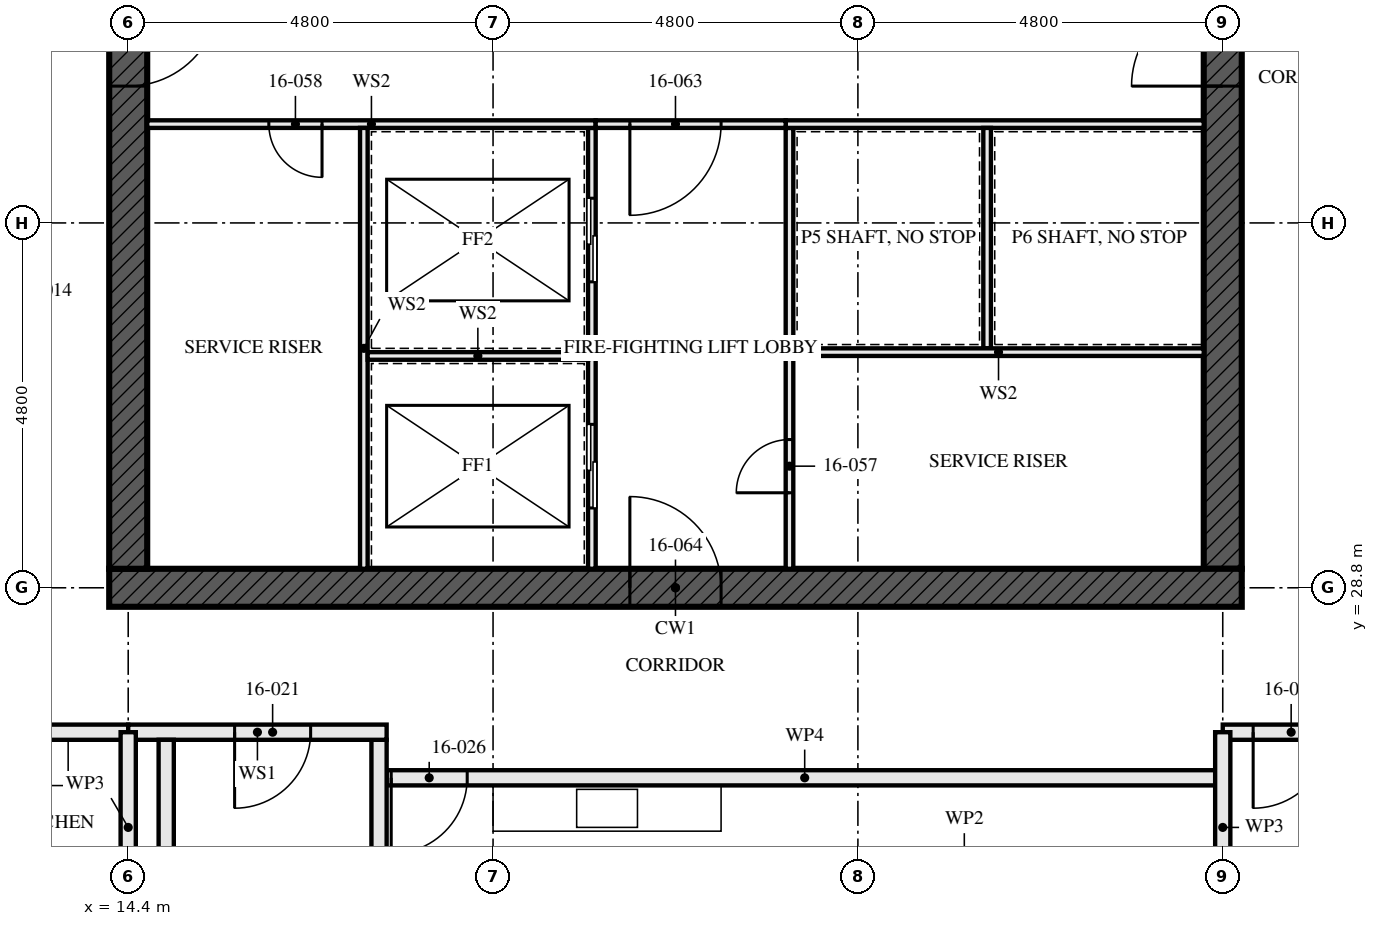
"""IFC4 building model, lengths in metres.
Left out: names, types, materials, properties, quantities, classifications, styles, units other than length and angle.
Written with IfcOpenShell. Run it as: python <this file> out.ifc"""

import sys

from ifc_helpers import new_model, si_unit, direction, frame, frame_2d, origin, place, context, subcontext, project, spatial, rectangle, extrude, element, fill, save


model = new_model("IFC4")
c1 = context("Model", 3, precision=1e-05, world=origin(), true_north=direction((0.0, 1.0)))
c2 = subcontext(c1, "Body", "Model", "MODEL_VIEW")
j1 = project(units=[si_unit("LENGTHUNIT", "METRE"), si_unit("PLANEANGLEUNIT", "RADIAN")], contexts=[c1])
p1 = place(None, origin())
s1 = spatial("IfcSite", under=j1, at=p1, CompositionType="ELEMENT")
p2 = place(p1, origin())
s2 = spatial("IfcBuilding", under=s1, at=p2, CompositionType="ELEMENT")
p3 = place(p2, frame((0.0, 0.0, 62.0)))
s3 = spatial("IfcBuildingStorey", under=s2, at=p3, CompositionType="ELEMENT", Elevation=62.0)
p4 = place(p3, frame((14.15, 28.8, -0.17), z_axis=(0.0, 0.0, 1.0), x_axis=(1.0, 0.0, 0.0)))
e1 = element("IfcWall", 1, at=p4, inside=s3, PredefinedType="SHEAR", context=c2, shape_type="SweptSolid", body=[
    extrude(rectangle(XDim=14.9, YDim=0.5, at=frame_2d((7.45, 0.0))), origin(), (0.0, 0.0, 1.0), 3.5),
])
p5 = place(p4, frame((6.85, 0.0, 0.17)))
e2 = element("IfcOpeningElement", 2, at=p5, cuts=e1, PredefinedType="OPENING", context=c2, shape_type="SweptSolid", body=[
    extrude(rectangle(XDim=1.2, YDim=2.1, at=frame_2d((0.6, 1.05))), frame((0.0, 0.26, 0.0), z_axis=(0.0, -1.0, 0.0), x_axis=(1.0, 0.0, 0.0)), (0.0, 0.0, 1.0), 0.521),
])
p6 = place(p3, frame((14.4, 42.95, -0.17), z_axis=(0.0, 0.0, 1.0), x_axis=(0.0, -1.0, 0.0)))
e3 = element("IfcWall", 3, at=p6, inside=s3, PredefinedType="SHEAR", context=c2, shape_type="SweptSolid", body=[
    extrude(rectangle(XDim=13.9, YDim=0.5, at=frame_2d((6.95, 0.0))), origin(), (0.0, 0.0, 1.0), 3.5),
])
p7 = place(p6, frame((6.35, 0.0, 0.17)))
e4 = element("IfcOpeningElement", 4, at=p7, cuts=e3, PredefinedType="OPENING", context=c2, shape_type="SweptSolid", body=[
    extrude(rectangle(XDim=1.2, YDim=2.1, at=frame_2d((0.6, 1.05))), frame((0.0, 0.26, 0.0), z_axis=(0.0, -1.0, 0.0), x_axis=(1.0, 0.0, 0.0)), (0.0, 0.0, 1.0), 0.521),
])
p8 = place(p3, frame((28.8, 29.05, -0.17), z_axis=(0.0, 0.0, 1.0), x_axis=(0.0, 1.0, 0.0)))
e5 = element("IfcWall", 5, at=p8, inside=s3, PredefinedType="SHEAR", context=c2, shape_type="SweptSolid", body=[
    extrude(rectangle(XDim=13.9, YDim=0.5, at=frame_2d((6.95, 0.0))), origin(), (0.0, 0.0, 1.0), 3.5),
])
p9 = place(p8, frame((6.35, 0.0, 0.17)))
e6 = element("IfcOpeningElement", 6, at=p9, cuts=e5, PredefinedType="OPENING", context=c2, shape_type="SweptSolid", body=[
    extrude(rectangle(XDim=1.2, YDim=2.1, at=frame_2d((0.6, 1.05))), frame((0.0, 0.26, 0.0), z_axis=(0.0, -1.0, 0.0), x_axis=(1.0, 0.0, 0.0)), (0.0, 0.0, 1.0), 0.521),
])
p10 = place(p3, frame((4.8, 26.9, 0.0), z_axis=(0.0, 0.0, 1.0), x_axis=(1.0, 0.0, 0.0)))
e7 = element("IfcWall", 7, at=p10, inside=s3, PredefinedType="PARTITIONING", context=c2, shape_type="SweptSolid", body=[
    extrude(rectangle(XDim=9.6, YDim=0.2, at=frame_2d((4.8, 0.0))), origin(), (0.0, 0.0, 1.0), 3.33),
])
p11 = place(p10, frame((0.4, 0.0, 0.0)))
e8 = element("IfcOpeningElement", 8, at=p11, cuts=e7, PredefinedType="OPENING", context=c2, shape_type="SweptSolid", body=[
    extrude(rectangle(XDim=1.0, YDim=2.1, at=frame_2d((0.5, 1.05))), frame((0.0, 0.111, 0.0), z_axis=(0.0, -1.0, 0.0), x_axis=(1.0, 0.0, 0.0)), (0.0, 0.0, 1.0), 0.221),
])
for number, where, z_axis, x_axis in (
    (9, (14.9, 22.1, 0.0), (0.0, 0.0, 1.0), (0.0, 1.0, 0.0)),
    (10, (17.7, 22.1, 0.0), (0.0, 0.0, 1.0), (0.0, 1.0, 0.0)),
):
    element("IfcWall", number, at=place(p3, frame(where, z_axis=z_axis, x_axis=x_axis)), inside=s3, PredefinedType="SOLIDWALL", context=c2, shape_type="SweptSolid", body=[
        extrude(rectangle(XDim=4.7, YDim=0.2, at=frame_2d((2.35, 0.0))), origin(), (0.0, 0.0, 1.0), 2.99),
    ])
p12 = place(p3, frame((14.4, 26.9, 0.0), z_axis=(0.0, 0.0, 1.0), x_axis=(1.0, 0.0, 0.0)))
e11 = element("IfcWall", 11, at=p12, inside=s3, PredefinedType="SOLIDWALL", context=c2, shape_type="SweptSolid", body=[
    extrude(rectangle(XDim=3.4, YDim=0.2, at=frame_2d((1.7, 0.0))), origin(), (0.0, 0.0, 1.0), 3.33),
])
p13 = place(p12, frame((1.4, 0.0, 0.0)))
e12 = element("IfcOpeningElement", 12, at=p13, cuts=e11, PredefinedType="OPENING", context=c2, shape_type="SweptSolid", body=[
    extrude(rectangle(XDim=1.0, YDim=2.1, at=frame_2d((0.5, 1.05))), frame((0.0, 0.111, 0.0), z_axis=(0.0, -1.0, 0.0), x_axis=(1.0, 0.0, 0.0)), (0.0, 0.0, 1.0), 0.221),
])
p14 = place(p3, frame((17.8, 26.3, 0.0), z_axis=(0.0, 0.0, 1.0), x_axis=(1.0, 0.0, 0.0)))
e13 = element("IfcWall", 13, at=p14, inside=s3, PredefinedType="PARTITIONING", context=c2, shape_type="SweptSolid", body=[
    extrude(rectangle(XDim=11.0, YDim=0.2, at=frame_2d((5.5, 0.0))), origin(), (0.0, 0.0, 1.0), 2.55),
])
p15 = place(p14, frame((0.06, 0.0, 0.0)))
e14 = element("IfcOpeningElement", 14, at=p15, cuts=e13, PredefinedType="OPENING", context=c2, shape_type="SweptSolid", body=[
    extrude(rectangle(XDim=1.0, YDim=2.1, at=frame_2d((0.5, 1.05))), frame((0.0, 0.111, 0.0), z_axis=(0.0, -1.0, 0.0), x_axis=(1.0, 0.0, 0.0)), (0.0, 0.0, 1.0), 0.221),
])
p16 = place(p3, frame((28.8, 26.9, 0.0), z_axis=(0.0, 0.0, 1.0), x_axis=(1.0, 0.0, 0.0)))
e15 = element("IfcWall", 15, at=p16, inside=s3, PredefinedType="PARTITIONING", context=c2, shape_type="SweptSolid", body=[
    extrude(rectangle(XDim=9.6, YDim=0.2, at=frame_2d((4.8, 0.0))), origin(), (0.0, 0.0, 1.0), 3.33),
])
p17 = place(p16, frame((0.4, 0.0, 0.0)))
e16 = element("IfcOpeningElement", 16, at=p17, cuts=e15, PredefinedType="OPENING", context=c2, shape_type="SweptSolid", body=[
    extrude(rectangle(XDim=1.0, YDim=2.1, at=frame_2d((0.5, 1.05))), frame((0.0, 0.111, 0.0), z_axis=(0.0, -1.0, 0.0), x_axis=(1.0, 0.0, 0.0)), (0.0, 0.0, 1.0), 0.221),
])
p18 = place(p3, frame((20.5, 29.05, 0.0), z_axis=(0.0, 0.0, 1.0), x_axis=(0.0, 1.0, 0.0)))
e17 = element("IfcWall", 17, at=p18, inside=s3, PredefinedType="SOLIDWALL", context=c2, shape_type="SweptSolid", body=[
    extrude(rectangle(XDim=5.8, YDim=0.1, at=frame_2d((2.9, 0.0))), origin(), (0.0, 0.0, 1.0), 3.33),
])
p19 = place(p18, frame((0.8, 0.0, 0.0)))
e18 = element("IfcOpeningElement", 18, at=p19, cuts=e17, PredefinedType="OPENING", context=c2, shape_type="SweptSolid", body=[
    extrude(rectangle(XDim=1.1, YDim=2.3, at=frame_2d((0.55, 1.15))), frame((0.0, 0.061, 0.0), z_axis=(0.0, -1.0, 0.0), x_axis=(1.0, 0.0, 0.0)), (0.0, 0.0, 1.0), 0.121),
])
p20 = place(p18, frame((3.775, 0.0, 0.0)))
e19 = element("IfcOpeningElement", 19, at=p20, cuts=e17, PredefinedType="OPENING", context=c2, shape_type="SweptSolid", body=[
    extrude(rectangle(XDim=1.1, YDim=2.3, at=frame_2d((0.55, 1.15))), frame((0.0, 0.061, 0.0), z_axis=(0.0, -1.0, 0.0), x_axis=(1.0, 0.0, 0.0)), (0.0, 0.0, 1.0), 0.121),
])
p21 = place(p3, frame((23.1, 29.05, 0.0), z_axis=(0.0, 0.0, 1.0), x_axis=(0.0, 1.0, 0.0)))
e20 = element("IfcWall", 20, at=p21, inside=s3, PredefinedType="SOLIDWALL", context=c2, shape_type="SweptSolid", body=[
    extrude(rectangle(XDim=5.8, YDim=0.1, at=frame_2d((2.9, 0.0))), origin(), (0.0, 0.0, 1.0), 3.33),
])
p22 = place(p21, frame((1.0, 0.0, 0.0)))
e21 = element("IfcOpeningElement", 21, at=p22, cuts=e20, PredefinedType="OPENING", context=c2, shape_type="SweptSolid", body=[
    extrude(rectangle(XDim=0.7, YDim=2.1, at=frame_2d((0.35, 1.05))), frame((0.0, 0.061, 0.0), z_axis=(0.0, -1.0, 0.0), x_axis=(1.0, 0.0, 0.0)), (0.0, 0.0, 1.0), 0.121),
])
p23 = place(p3, frame((14.65, 34.9, 0.0), z_axis=(0.0, 0.0, 1.0), x_axis=(1.0, 0.0, 0.0)))
e22 = element("IfcWall", 22, at=p23, inside=s3, PredefinedType="SOLIDWALL", context=c2, shape_type="SweptSolid", body=[
    extrude(rectangle(XDim=5.9, YDim=0.1, at=frame_2d((2.95, 0.0))), origin(), (0.0, 0.0, 1.0), 3.33),
])
p24 = place(p23, frame((1.6, 0.0, 0.0)))
e23 = element("IfcOpeningElement", 23, at=p24, cuts=e22, PredefinedType="OPENING", context=c2, shape_type="SweptSolid", body=[
    extrude(rectangle(XDim=0.7, YDim=2.1, at=frame_2d((0.35, 1.05))), frame((0.0, 0.061, 0.0), z_axis=(0.0, -1.0, 0.0), x_axis=(1.0, 0.0, 0.0)), (0.0, 0.0, 1.0), 0.121),
])
p25 = place(p3, frame((23.05, 34.9, 0.0), z_axis=(0.0, 0.0, 1.0), x_axis=(1.0, 0.0, 0.0)))
e24 = element("IfcWall", 24, at=p25, inside=s3, PredefinedType="SOLIDWALL", context=c2, shape_type="SweptSolid", body=[
    extrude(rectangle(XDim=5.5, YDim=0.1, at=frame_2d((2.75, 0.0))), origin(), (0.0, 0.0, 1.0), 3.33),
])
p26 = place(p3, frame((20.55, 34.9, 0.0), z_axis=(0.0, 0.0, 1.0), x_axis=(1.0, 0.0, 0.0)))
e25 = element("IfcWall", 25, at=p26, inside=s3, PredefinedType="SOLIDWALL", context=c2, shape_type="SweptSolid", body=[
    extrude(rectangle(XDim=2.5, YDim=0.1, at=frame_2d((1.25, 0.0))), origin(), (0.0, 0.0, 1.0), 3.33),
])
p27 = place(p26, frame((0.45, 0.0, 0.0)))
e26 = element("IfcOpeningElement", 26, at=p27, cuts=e25, PredefinedType="OPENING", context=c2, shape_type="SweptSolid", body=[
    extrude(rectangle(XDim=1.2, YDim=2.1, at=frame_2d((0.6, 1.05))), frame((0.0, 0.061, 0.0), z_axis=(0.0, -1.0, 0.0), x_axis=(1.0, 0.0, 0.0)), (0.0, 0.0, 1.0), 0.121),
])
p28 = place(p3, frame((17.5, 29.05, 0.0), z_axis=(0.0, 0.0, 1.0), x_axis=(0.0, 1.0, 0.0)))
e27 = element("IfcWall", 27, at=p28, inside=s3, PredefinedType="SOLIDWALL", context=c2, shape_type="SweptSolid", body=[
    extrude(rectangle(XDim=5.8, YDim=0.1, at=frame_2d((2.9, 0.0))), origin(), (0.0, 0.0, 1.0), 3.33),
])
p29 = place(p3, frame((17.55, 31.85, 0.0), z_axis=(0.0, 0.0, 1.0), x_axis=(1.0, 0.0, 0.0)))
e28 = element("IfcWall", 28, at=p29, inside=s3, PredefinedType="SOLIDWALL", context=c2, shape_type="SweptSolid", body=[
    extrude(rectangle(XDim=2.9, YDim=0.1, at=frame_2d((1.45, 0.0))), origin(), (0.0, 0.0, 1.0), 3.33),
])
p30 = place(p3, frame((25.7, 31.95, 0.0), z_axis=(0.0, 0.0, 1.0), x_axis=(0.0, 1.0, 0.0)))
e29 = element("IfcWall", 29, at=p30, inside=s3, PredefinedType="SOLIDWALL", context=c2, shape_type="SweptSolid", body=[
    extrude(rectangle(XDim=2.9, YDim=0.1, at=frame_2d((1.45, 0.0))), origin(), (0.0, 0.0, 1.0), 3.33),
])
p31 = place(p3, frame((23.15, 31.9, 0.0), z_axis=(0.0, 0.0, 1.0), x_axis=(1.0, 0.0, 0.0)))
e30 = element("IfcWall", 30, at=p31, inside=s3, PredefinedType="SOLIDWALL", context=c2, shape_type="SweptSolid", body=[
    extrude(rectangle(XDim=5.4, YDim=0.1, at=frame_2d((2.7, 0.0))), origin(), (0.0, 0.0, 1.0), 3.33),
])
for number, where, z_axis, x_axis in (
    (31, (14.4, 24.395, 0.0), (0.0, 0.0, 1.0), (0.0, 1.0, 0.0)),
    (32, (28.8, 24.395, 0.0), (0.0, 0.0, 1.0), (0.0, 1.0, 0.0)),
):
    element("IfcWall", number, at=place(p3, frame(where, z_axis=z_axis, x_axis=x_axis)), inside=s3, PredefinedType="PARTITIONING", context=c2, shape_type="SweptSolid", body=[
        extrude(rectangle(XDim=2.505, YDim=0.2, at=frame_2d((1.252, 0.0))), origin(), (0.0, 0.0, 1.0), 2.32),
    ])
p32 = place(p13, frame((1.0, 0.0, 0.0), z_axis=(0.0, 0.0, 1.0), x_axis=(-1.0, 0.0, 0.0)))
e33 = element("IfcDoor", 33, at=p32, inside=s3, OperationType="SINGLE_SWING_LEFT", PredefinedType="DOOR", context=c2, shape_type="SweptSolid", body=[
    extrude(rectangle(XDim=1.0, YDim=2.1, at=frame_2d((0.5, 1.05))), frame((0.0, 0.032, 0.0), z_axis=(0.0, -1.0, 0.0), x_axis=(1.0, 0.0, 0.0)), (0.0, 0.0, 1.0), 0.064),
])
fill(e12, e33)
p33 = place(p15, frame((1.0, 0.0, 0.0), z_axis=(0.0, 0.0, 1.0), x_axis=(-1.0, 0.0, 0.0)))
e34 = element("IfcDoor", 34, at=p33, inside=s3, OperationType="SINGLE_SWING_LEFT", PredefinedType="DOOR", context=c2, shape_type="SweptSolid", body=[
    extrude(rectangle(XDim=1.0, YDim=2.1, at=frame_2d((0.5, 1.05))), frame((0.0, 0.027, 0.0), z_axis=(0.0, -1.0, 0.0), x_axis=(1.0, 0.0, 0.0)), (0.0, 0.0, 1.0), 0.054),
])
fill(e14, e34)
p34 = place(p17, frame((1.0, 0.0, 0.0), z_axis=(0.0, 0.0, 1.0), x_axis=(-1.0, 0.0, 0.0)))
e35 = element("IfcDoor", 35, at=p34, inside=s3, OperationType="SINGLE_SWING_LEFT", PredefinedType="DOOR", context=c2, shape_type="SweptSolid", body=[
    extrude(rectangle(XDim=1.0, YDim=2.1, at=frame_2d((0.5, 1.05))), frame((0.0, 0.027, 0.0), z_axis=(0.0, -1.0, 0.0), x_axis=(1.0, 0.0, 0.0)), (0.0, 0.0, 1.0), 0.054),
])
fill(e16, e35)
p35 = place(p19, origin())
e36 = element("IfcDoor", 36, at=p35, inside=s3, OperationType="SLIDING_TO_LEFT", PredefinedType="DOOR", context=c2, shape_type="SweptSolid", body=[
    extrude(rectangle(XDim=1.1, YDim=2.3, at=frame_2d((0.55, 1.15))), frame((0.0, 0.05, 0.0), z_axis=(0.0, -1.0, 0.0), x_axis=(1.0, 0.0, 0.0)), (0.0, 0.0, 1.0), 0.1),
])
fill(e18, e36)
p36 = place(p20, origin())
e37 = element("IfcDoor", 37, at=p36, inside=s3, OperationType="SLIDING_TO_LEFT", PredefinedType="DOOR", context=c2, shape_type="SweptSolid", body=[
    extrude(rectangle(XDim=1.1, YDim=2.3, at=frame_2d((0.55, 1.15))), frame((0.0, 0.05, 0.0), z_axis=(0.0, -1.0, 0.0), x_axis=(1.0, 0.0, 0.0)), (0.0, 0.0, 1.0), 0.1),
])
fill(e19, e37)
p37 = place(p22, origin())
e38 = element("IfcDoor", 38, at=p37, inside=s3, OperationType="SINGLE_SWING_RIGHT", PredefinedType="DOOR", context=c2, shape_type="SweptSolid", body=[
    extrude(rectangle(XDim=0.7, YDim=2.1, at=frame_2d((0.35, 1.05))), frame((0.0, 0.027, 0.0), z_axis=(0.0, -1.0, 0.0), x_axis=(1.0, 0.0, 0.0)), (0.0, 0.0, 1.0), 0.054),
])
fill(e21, e38)
p38 = place(p24, frame((0.7, 0.0, 0.0), z_axis=(0.0, 0.0, 1.0), x_axis=(-1.0, 0.0, 0.0)))
e39 = element("IfcDoor", 39, at=p38, inside=s3, OperationType="SINGLE_SWING_RIGHT", PredefinedType="DOOR", context=c2, shape_type="SweptSolid", body=[
    extrude(rectangle(XDim=0.7, YDim=2.1, at=frame_2d((0.35, 1.05))), frame((0.0, 0.027, 0.0), z_axis=(0.0, -1.0, 0.0), x_axis=(1.0, 0.0, 0.0)), (0.0, 0.0, 1.0), 0.054),
])
fill(e23, e39)
p39 = place(p27, frame((1.2, 0.0, 0.0), z_axis=(0.0, 0.0, 1.0), x_axis=(-1.0, 0.0, 0.0)))
e40 = element("IfcDoor", 40, at=p39, inside=s3, OperationType="SINGLE_SWING_LEFT", PredefinedType="DOOR", context=c2, shape_type="SweptSolid", body=[
    extrude(rectangle(XDim=1.2, YDim=2.1, at=frame_2d((0.6, 1.05))), frame((0.0, 0.027, 0.0), z_axis=(0.0, -1.0, 0.0), x_axis=(1.0, 0.0, 0.0)), (0.0, 0.0, 1.0), 0.054),
])
fill(e26, e40)
p40 = place(p5, origin())
e41 = element("IfcDoor", 41, at=p40, inside=s3, OperationType="SINGLE_SWING_LEFT", PredefinedType="DOOR", context=c2, shape_type="SweptSolid", body=[
    extrude(rectangle(XDim=1.2, YDim=2.1, at=frame_2d((0.6, 1.05))), frame((0.0, 0.027, 0.0), z_axis=(0.0, -1.0, 0.0), x_axis=(1.0, 0.0, 0.0)), (0.0, 0.0, 1.0), 0.054),
])
fill(e2, e41)
p41 = place(p7, origin())
e42 = element("IfcDoor", 42, at=p41, inside=s3, OperationType="SINGLE_SWING_LEFT", PredefinedType="DOOR", context=c2, shape_type="SweptSolid", body=[
    extrude(rectangle(XDim=1.2, YDim=2.1, at=frame_2d((0.6, 1.05))), frame((0.0, 0.027, 0.0), z_axis=(0.0, -1.0, 0.0), x_axis=(1.0, 0.0, 0.0)), (0.0, 0.0, 1.0), 0.054),
])
fill(e4, e42)
p42 = place(p9, origin())
e43 = element("IfcDoor", 43, at=p42, inside=s3, OperationType="SINGLE_SWING_LEFT", PredefinedType="DOOR", context=c2, shape_type="SweptSolid", body=[
    extrude(rectangle(XDim=1.2, YDim=2.1, at=frame_2d((0.6, 1.05))), frame((0.0, 0.027, 0.0), z_axis=(0.0, -1.0, 0.0), x_axis=(1.0, 0.0, 0.0)), (0.0, 0.0, 1.0), 0.054),
])
fill(e6, e43)
save(model, sys.argv[1])
